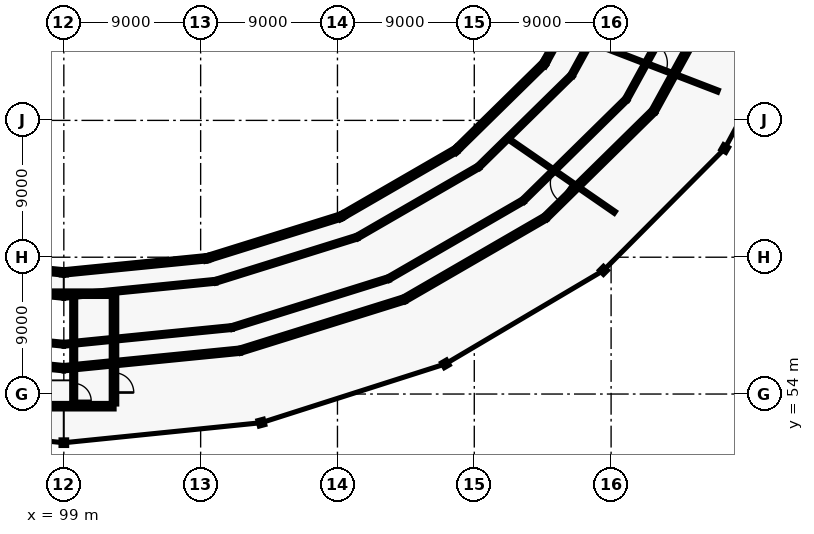
"""IFC4 building model, lengths in metres.
Left out: names, types, materials, properties, quantities, classifications, styles, units other than length and angle.
Written with IfcOpenShell. Run it as: python <this file> out.ifc"""

import sys

from ifc_helpers import new_model, si_unit, direction, frame, frame_2d, origin, origin_2d, place, context, subcontext, project, spatial, rectangle, hollow_circle, extrude, element, fill, save


model = new_model("IFC4")
c1 = context("Model", 3, precision=1e-05, world=origin(), true_north=direction((0.0, 1.0)))
c2 = subcontext(c1, "Body", "Model", "MODEL_VIEW")
j1 = project(units=[si_unit("LENGTHUNIT", "METRE"), si_unit("PLANEANGLEUNIT", "RADIAN")], contexts=[c1])
p1 = place(None, origin())
s1 = spatial("IfcSite", under=j1, at=p1, CompositionType="ELEMENT")
p2 = place(p1, origin())
s2 = spatial("IfcBuilding", under=s1, at=p2, CompositionType="ELEMENT")
p3 = place(p2, frame((0.0, 0.0, 9.6)))
s3 = spatial("IfcBuildingStorey", under=s2, at=p3, CompositionType="ELEMENT", Elevation=9.6)
p4 = place(p3, frame((99.0, 62.0, 0.0), z_axis=(0.0, 0.0, 1.0), x_axis=(0.0, -1.0, 0.0)))
e1 = element("IfcColumn", 1, at=p4, inside=s3, PredefinedType="COLUMN", context=c2, shape_type="SweptSolid", body=[
    extrude(hollow_circle(Radius=0.162, WallThickness=0.016, at=origin_2d()), origin(), (0.0, 0.0, 1.0), 4.38),
])
p5 = place(p3, frame((99.0, 50.8, 0.0), z_axis=(0.0, 0.0, 1.0), x_axis=(0.0, -1.0, 0.0)))
e2 = element("IfcColumn", 2, at=p5, inside=s3, PredefinedType="COLUMN", context=c2, shape_type="SweptSolid", body=[
    extrude(hollow_circle(Radius=0.178, WallThickness=0.016, at=origin_2d()), origin(), (0.0, 0.0, 1.0), 3.38),
])
p6 = place(p3, frame((108.447, 62.937, 0.0), z_axis=(0.0, 0.0, 1.0), x_axis=(0.258819045103, -0.965925826289, 0.0)))
e3 = element("IfcColumn", 3, at=p6, inside=s3, PredefinedType="COLUMN", context=c2, shape_type="SweptSolid", body=[
    extrude(hollow_circle(Radius=0.162, WallThickness=0.016, at=origin_2d()), origin(), (0.0, 0.0, 1.0), 4.38),
])
p7 = place(p3, frame((111.993, 52.119, 0.0), z_axis=(0.0, 0.0, 1.0), x_axis=(0.258819045103, -0.965925826289, 0.0)))
e4 = element("IfcColumn", 4, at=p7, inside=s3, PredefinedType="COLUMN", context=c2, shape_type="SweptSolid", body=[
    extrude(hollow_circle(Radius=0.178, WallThickness=0.016, at=origin_2d()), origin(), (0.0, 0.0, 1.0), 3.38),
])
p8 = place(p3, frame((117.25, 65.684, 0.0), z_axis=(0.0, 0.0, 1.0), x_axis=(0.5, -0.866025403784, 0.0)))
e5 = element("IfcColumn", 5, at=p8, inside=s3, PredefinedType="COLUMN", context=c2, shape_type="SweptSolid", body=[
    extrude(hollow_circle(Radius=0.162, WallThickness=0.016, at=origin_2d()), origin(), (0.0, 0.0, 1.0), 4.38),
])
p9 = place(p3, frame((124.1, 55.985, 0.0), z_axis=(0.0, 0.0, 1.0), x_axis=(0.5, -0.866025403784, 0.0)))
e6 = element("IfcColumn", 6, at=p9, inside=s3, PredefinedType="COLUMN", context=c2, shape_type="SweptSolid", body=[
    extrude(hollow_circle(Radius=0.178, WallThickness=0.016, at=origin_2d()), origin(), (0.0, 0.0, 1.0), 3.38),
])
p10 = place(p3, frame((124.809, 70.055, 0.0), z_axis=(0.0, 0.0, 1.0), x_axis=(0.707106781187, -0.707106781187, 0.0)))
e7 = element("IfcColumn", 7, at=p10, inside=s3, PredefinedType="COLUMN", context=c2, shape_type="SweptSolid", body=[
    extrude(hollow_circle(Radius=0.162, WallThickness=0.016, at=origin_2d()), origin(), (0.0, 0.0, 1.0), 4.38),
])
p11 = place(p3, frame((134.497, 62.135, 0.0), z_axis=(0.0, 0.0, 1.0), x_axis=(0.707106781187, -0.707106781187, 0.0)))
e8 = element("IfcColumn", 8, at=p11, inside=s3, PredefinedType="COLUMN", context=c2, shape_type="SweptSolid", body=[
    extrude(hollow_circle(Radius=0.178, WallThickness=0.016, at=origin_2d()), origin(), (0.0, 0.0, 1.0), 3.38),
])
p12 = place(p3, frame((130.61, 75.75, 0.0), z_axis=(0.0, 0.0, 1.0), x_axis=(0.866025403784, -0.5, 0.0)))
e9 = element("IfcColumn", 9, at=p12, inside=s3, PredefinedType="COLUMN", context=c2, shape_type="SweptSolid", body=[
    extrude(hollow_circle(Radius=0.162, WallThickness=0.016, at=origin_2d()), origin(), (0.0, 0.0, 1.0), 4.38),
])
p13 = place(p3, frame((142.474, 70.15, 0.0), z_axis=(0.0, 0.0, 1.0), x_axis=(0.866025403784, -0.5, 0.0)))
e10 = element("IfcColumn", 10, at=p13, inside=s3, PredefinedType="COLUMN", context=c2, shape_type="SweptSolid", body=[
    extrude(hollow_circle(Radius=0.178, WallThickness=0.016, at=origin_2d()), origin(), (0.0, 0.0, 1.0), 3.38),
])
p14 = place(p3, frame((87.405, 56.852, 4.53), z_axis=(0.0, 0.0, 1.0), x_axis=(0.995099849345, -0.098875122419, 0.0)))
e11 = element("IfcWall", 11, at=p14, inside=s3, PredefinedType="SOLIDWALL", context=c2, shape_type="SweptSolid", body=[
    extrude(rectangle(XDim=11.652, YDim=0.34, at=frame_2d((5.826, 0.0))), origin(), (0.0, 0.0, 1.0), 3.02),
])
p15 = place(p3, frame((89.553, 62.937, 4.39), z_axis=(0.0, 0.0, 1.0), x_axis=(0.995117073258, -0.098701623651, 0.0)))
e12 = element("IfcWall", 12, at=p15, inside=s3, PredefinedType="SOLIDWALL", context=c2, shape_type="SweptSolid", body=[
    extrude(rectangle(XDim=9.493, YDim=0.34, at=frame_2d((4.747, 0.0))), origin(), (0.0, 0.0, 1.0), 3.16),
])
p16 = place(p3, frame((87.942, 58.373, 7.58), z_axis=(0.0, 0.0, 1.0), x_axis=(0.995105258288, -0.098820670548, 0.0)))
e13 = element("IfcWall", 13, at=p16, inside=s3, PredefinedType="SOLIDWALL", context=c2, shape_type="SweptSolid", body=[
    extrude(rectangle(XDim=11.113, YDim=0.24, at=frame_2d((5.556, 0.0))), origin(), (0.0, 0.0, 1.0), 2.37),
])
p17 = place(p3, frame((89.016, 61.416, 7.58), z_axis=(0.0, 0.0, 1.0), x_axis=(0.995110163253, -0.098771266021, 0.0)))
e14 = element("IfcWall", 14, at=p17, inside=s3, PredefinedType="SOLIDWALL", context=c2, shape_type="SweptSolid", body=[
    extrude(rectangle(XDim=10.033, YDim=0.24, at=frame_2d((5.017, 0.0))), origin(), (0.0, 0.0, 1.0), 2.37),
])
p18 = place(p3, frame((99.0, 55.7, 4.53), z_axis=(0.0, 0.0, 1.0), x_axis=(0.995099849345, 0.098875122419, 0.0)))
e15 = element("IfcWall", 15, at=p18, inside=s3, PredefinedType="SOLIDWALL", context=c2, shape_type="SweptSolid", body=[
    extrude(rectangle(XDim=11.652, YDim=0.34, at=frame_2d((5.826, 0.0))), origin(), (0.0, 0.0, 1.0), 3.02),
])
p19 = place(p3, frame((99.0, 62.0, 4.39), z_axis=(0.0, 0.0, 1.0), x_axis=(0.995117073258, 0.098701623651, 0.0)))
e16 = element("IfcWall", 16, at=p19, inside=s3, PredefinedType="SOLIDWALL", context=c2, shape_type="SweptSolid", body=[
    extrude(rectangle(XDim=9.493, YDim=0.34, at=frame_2d((4.747, 0.0))), origin(), (0.0, 0.0, 1.0), 3.16),
])
p20 = place(p3, frame((99.0, 57.275, 7.58), z_axis=(0.0, 0.0, 1.0), x_axis=(0.995105258288, 0.098820670548, 0.0)))
e17 = element("IfcWall", 17, at=p20, inside=s3, PredefinedType="SOLIDWALL", context=c2, shape_type="SweptSolid", body=[
    extrude(rectangle(XDim=11.113, YDim=0.24, at=frame_2d((5.556, 0.0))), origin(), (0.0, 0.0, 1.0), 2.37),
])
p21 = place(p3, frame((99.0, 60.425, 7.58), z_axis=(0.0, 0.0, 1.0), x_axis=(0.995110163253, 0.098771266021, 0.0)))
e18 = element("IfcWall", 18, at=p21, inside=s3, PredefinedType="SOLIDWALL", context=c2, shape_type="SweptSolid", body=[
    extrude(rectangle(XDim=10.033, YDim=0.24, at=frame_2d((5.017, 0.0))), origin(), (0.0, 0.0, 1.0), 2.37),
])
p22 = place(p3, frame((110.595, 56.852, 4.53), z_axis=(0.0, 0.0, 1.0), x_axis=(0.95449417592, 0.298229556107, 0.0)))
e19 = element("IfcWall", 19, at=p22, inside=s3, PredefinedType="SOLIDWALL", context=c2, shape_type="SweptSolid", body=[
    extrude(rectangle(XDim=11.32, YDim=0.34, at=frame_2d((5.66, 0.0))), origin(), (0.0, 0.0, 1.0), 3.02),
])
p23 = place(p3, frame((108.447, 62.937, 4.39), z_axis=(0.0, 0.0, 1.0), x_axis=(0.9545990852, 0.297893582568, 0.0)))
e20 = element("IfcWall", 20, at=p23, inside=s3, PredefinedType="SOLIDWALL", context=c2, shape_type="SweptSolid", body=[
    extrude(rectangle(XDim=9.222, YDim=0.34, at=frame_2d((4.611, 0.0))), origin(), (0.0, 0.0, 1.0), 3.16),
])
p24 = place(p3, frame((110.058, 58.373, 7.58), z_axis=(0.0, 0.0, 1.0), x_axis=(0.954514174424, 0.298165542651, 0.0)))
e21 = element("IfcWall", 21, at=p24, inside=s3, PredefinedType="SOLIDWALL", context=c2, shape_type="SweptSolid", body=[
    extrude(rectangle(XDim=10.796, YDim=0.24, at=frame_2d((5.398, 0.0))), origin(), (0.0, 0.0, 1.0), 2.37),
])
p25 = place(p3, frame((108.984, 61.416, 7.58), z_axis=(0.0, 0.0, 1.0), x_axis=(0.954582431614, 0.29794694369, 0.0)))
e22 = element("IfcWall", 22, at=p25, inside=s3, PredefinedType="SOLIDWALL", context=c2, shape_type="SweptSolid", body=[
    extrude(rectangle(XDim=9.747, YDim=0.24, at=frame_2d((4.874, 0.0))), origin(), (0.0, 0.0, 1.0), 2.37),
])
p26 = place(p3, frame((121.4, 60.228, 4.53), z_axis=(0.0, 0.0, 1.0), x_axis=(0.865403937833, 0.501074869039, 0.0)))
e23 = element("IfcWall", 23, at=p26, inside=s3, PredefinedType="SOLIDWALL", context=c2, shape_type="SweptSolid", body=[
    extrude(rectangle(XDim=10.721, YDim=0.34, at=frame_2d((5.361, 0.0))), origin(), (0.0, 0.0, 1.0), 3.02),
])
p27 = place(p3, frame((117.25, 65.684, 4.39), z_axis=(0.0, 0.0, 1.0), x_axis=(0.865697347457, 0.500567780231, 0.0)))
e24 = element("IfcWall", 24, at=p27, inside=s3, PredefinedType="SOLIDWALL", context=c2, shape_type="SweptSolid", body=[
    extrude(rectangle(XDim=8.732, YDim=0.34, at=frame_2d((4.366, 0.0))), origin(), (0.0, 0.0, 1.0), 3.16),
])
p28 = place(p3, frame((120.363, 61.592, 7.58), z_axis=(0.0, 0.0, 1.0), x_axis=(0.865494949489, 0.500917650328, 0.0)))
e25 = element("IfcWall", 25, at=p28, inside=s3, PredefinedType="SOLIDWALL", context=c2, shape_type="SweptSolid", body=[
    extrude(rectangle(XDim=10.223, YDim=0.24, at=frame_2d((5.111, 0.0))), origin(), (0.0, 0.0, 1.0), 2.37),
])
p29 = place(p3, frame((118.288, 64.32, 7.58), z_axis=(0.0, 0.0, 1.0), x_axis=(0.865631472937, 0.500681688362, 0.0)))
e26 = element("IfcWall", 26, at=p29, inside=s3, PredefinedType="SOLIDWALL", context=c2, shape_type="SweptSolid", body=[
    extrude(rectangle(XDim=9.229, YDim=0.24, at=frame_2d((4.615, 0.0))), origin(), (0.0, 0.0, 1.0), 2.37),
])
p30 = place(p3, frame((130.678, 65.6, 4.53), z_axis=(0.0, 0.0, 1.0), x_axis=(0.713096204455, 0.701066190307, 0.0)))
e27 = element("IfcWall", 27, at=p30, inside=s3, PredefinedType="SOLIDWALL", context=c2, shape_type="SweptSolid", body=[
    extrude(rectangle(XDim=9.985, YDim=0.34, at=frame_2d((4.992, 0.0))), origin(), (0.0, 0.0, 1.0), 3.02),
])
p31 = place(p3, frame((124.809, 70.055, 4.39), z_axis=(0.0, 0.0, 1.0), x_axis=(0.713593723838, 0.700559774251, 0.0)))
e28 = element("IfcWall", 28, at=p31, inside=s3, PredefinedType="SOLIDWALL", context=c2, shape_type="SweptSolid", body=[
    extrude(rectangle(XDim=8.129, YDim=0.34, at=frame_2d((4.065, 0.0))), origin(), (0.0, 0.0, 1.0), 3.16),
])
p32 = place(p3, frame((129.211, 66.713, 7.58), z_axis=(0.0, 0.0, 1.0), x_axis=(0.713170660677, 0.700990448401, 0.0)))
e29 = element("IfcWall", 29, at=p32, inside=s3, PredefinedType="SOLIDWALL", context=c2, shape_type="SweptSolid", body=[
    extrude(rectangle(XDim=9.521, YDim=0.24, at=frame_2d((4.76, 0.0))), origin(), (0.0, 0.0, 1.0), 2.37),
])
p33 = place(p3, frame((126.277, 68.941, 7.58), z_axis=(0.0, 0.0, 1.0), x_axis=(0.713414677491, 0.700742105157, 0.0)))
e30 = element("IfcWall", 30, at=p33, inside=s3, PredefinedType="SOLIDWALL", context=c2, shape_type="SweptSolid", body=[
    extrude(rectangle(XDim=8.592, YDim=0.24, at=frame_2d((4.296, 0.0))), origin(), (0.0, 0.0, 1.0), 2.37),
])
p34 = place(p3, frame((137.798, 72.6, 4.53), z_axis=(0.0, 0.0, 1.0), x_axis=(0.481203038707, 0.876609169208, 0.0)))
e31 = element("IfcWall", 31, at=p34, inside=s3, PredefinedType="SOLIDWALL", context=c2, shape_type="SweptSolid", body=[
    extrude(rectangle(XDim=9.299, YDim=0.34, at=frame_2d((4.65, 0.0))), origin(), (0.0, 0.0, 1.0), 3.02),
])
p35 = place(p3, frame((130.61, 75.75, 4.39), z_axis=(0.0, 0.0, 1.0), x_axis=(0.481751565348, 0.876307839338, 0.0)))
e32 = element("IfcWall", 32, at=p35, inside=s3, PredefinedType="SOLIDWALL", context=c2, shape_type="SweptSolid", body=[
    extrude(rectangle(XDim=7.568, YDim=0.34, at=frame_2d((3.784, 0.0))), origin(), (0.0, 0.0, 1.0), 3.16),
])
p36 = place(p3, frame((136.001, 73.387, 7.58), z_axis=(0.0, 0.0, 1.0), x_axis=(0.48130775835, 0.876551676601, 0.0)))
e33 = element("IfcWall", 33, at=p36, inside=s3, PredefinedType="SOLIDWALL", context=c2, shape_type="SweptSolid", body=[
    extrude(rectangle(XDim=8.868, YDim=0.24, at=frame_2d((4.434, 0.0))), origin(), (0.0, 0.0, 1.0), 2.37),
])
p37 = place(p3, frame((132.407, 74.962, 7.58), z_axis=(0.0, 0.0, 1.0), x_axis=(0.481607192972, 0.876387192785, 0.0)))
e34 = element("IfcWall", 34, at=p37, inside=s3, PredefinedType="SOLIDWALL", context=c2, shape_type="SweptSolid", body=[
    extrude(rectangle(XDim=8.002, YDim=0.24, at=frame_2d((4.001, 0.0))), origin(), (0.0, 0.0, 1.0), 2.37),
])
for number, where, z_axis, x_axis in (
    (35, (95.7, 53.2, 0.0), (0.0, 0.0, 1.0), (1.0, 0.0, 0.0)),
    (36, (95.7, 60.6, 0.0), (0.0, 0.0, 1.0), (1.0, 0.0, 0.0)),
):
    element("IfcWall", number, at=place(p3, frame(where, z_axis=z_axis, x_axis=x_axis)), inside=s3, PredefinedType="SHEAR", context=c2, shape_type="SweptSolid", body=[
        extrude(rectangle(XDim=6.6, YDim=0.35, at=frame_2d((3.3, 0.0))), origin(), (0.0, 0.0, 1.0), 3.4),
    ])
p38 = place(p3, frame((102.3, 53.35, 0.0), z_axis=(0.0, 0.0, 1.0), x_axis=(0.0, 1.0, 0.0)))
e37 = element("IfcWall", 37, at=p38, inside=s3, PredefinedType="SHEAR", context=c2, shape_type="SweptSolid", body=[
    extrude(rectangle(XDim=7.1, YDim=0.35, at=frame_2d((3.55, 0.0))), origin(), (0.0, 0.0, 1.0), 3.4),
])
p39 = place(p38, frame((0.75, 0.0, 0.0)))
e38 = element("IfcOpeningElement", 38, at=p39, cuts=e37, PredefinedType="OPENING", context=c2, shape_type="SweptSolid", body=[
    extrude(rectangle(XDim=1.3, YDim=2.15, at=frame_2d((0.65, 1.075))), frame((0.0, 0.185, 0.0), z_axis=(0.0, -1.0, 0.0), x_axis=(1.0, 0.0, 0.0)), (0.0, 0.0, 1.0), 0.37),
])
p40 = place(p3, frame((99.65, 53.35, 0.0), z_axis=(0.0, 0.0, 1.0), x_axis=(0.0, 1.0, 0.0)))
e39 = element("IfcWall", 39, at=p40, inside=s3, PredefinedType="SHEAR", context=c2, shape_type="SweptSolid", body=[
    extrude(rectangle(XDim=7.1, YDim=0.25, at=frame_2d((3.55, 0.0))), origin(), (0.0, 0.0, 1.0), 3.4),
])
p41 = place(p40, frame((0.2, 0.0, 0.0)))
e40 = element("IfcOpeningElement", 40, at=p41, cuts=e39, PredefinedType="OPENING", context=c2, shape_type="SweptSolid", body=[
    extrude(rectangle(XDim=1.15, YDim=2.15, at=frame_2d((0.575, 1.075))), frame((0.0, 0.135, 0.0), z_axis=(0.0, -1.0, 0.0), x_axis=(1.0, 0.0, 0.0)), (0.0, 0.0, 1.0), 0.27),
])
p42 = place(p3, frame((128.475, 70.626, 0.0), z_axis=(0.0, 0.0, 1.0), x_axis=(0.822666462931, -0.568524309743, 0.0)))
e41 = element("IfcWall", 41, at=p42, inside=s3, PredefinedType="PARTITIONING", context=c2, shape_type="SweptSolid", body=[
    extrude(rectangle(XDim=8.223, YDim=0.13, at=frame_2d((4.112, 0.0))), origin(), (0.0, 0.0, 1.0), 2.9),
])
p43 = place(p42, frame((3.387, 0.0, 0.0)))
e42 = element("IfcOpeningElement", 42, at=p43, cuts=e41, PredefinedType="OPENING", context=c2, shape_type="SweptSolid", body=[
    extrude(rectangle(XDim=1.45, YDim=2.15, at=frame_2d((0.725, 1.075))), frame((0.0, 0.075, 0.0), z_axis=(0.0, -1.0, 0.0), x_axis=(1.0, 0.0, 0.0)), (0.0, 0.0, 1.0), 0.15),
])
p44 = place(p3, frame((133.83, 77.082, 0.0), z_axis=(0.0, 0.0, 1.0), x_axis=(0.933238808021, -0.359256631399, 0.0)))
e43 = element("IfcWall", 43, at=p44, inside=s3, PredefinedType="PARTITIONING", context=c2, shape_type="SweptSolid", body=[
    extrude(rectangle(XDim=8.782, YDim=0.13, at=frame_2d((4.391, 0.0))), origin(), (0.0, 0.0, 1.0), 2.9),
])
p45 = place(p44, frame((3.666, 0.0, 0.0)))
e44 = element("IfcOpeningElement", 44, at=p45, cuts=e43, PredefinedType="OPENING", context=c2, shape_type="SweptSolid", body=[
    extrude(rectangle(XDim=1.45, YDim=2.15, at=frame_2d((0.725, 1.075))), frame((0.0, 0.075, 0.0), z_axis=(0.0, -1.0, 0.0), x_axis=(1.0, 0.0, 0.0)), (0.0, 0.0, 1.0), 0.15),
])
p46 = place(p39, frame((1.3, 0.0, 0.0), z_axis=(0.0, 0.0, 1.0), x_axis=(-1.0, 0.0, 0.0)))
e45 = element("IfcDoor", 45, at=p46, inside=s3, OperationType="DOUBLE_DOOR_SINGLE_SWING", PredefinedType="DOOR", context=c2, shape_type="SweptSolid", body=[
    extrude(rectangle(XDim=1.3, YDim=2.15, at=frame_2d((0.65, 1.075))), frame((0.0, 0.025, 0.0), z_axis=(0.0, -1.0, 0.0), x_axis=(1.0, 0.0, 0.0)), (0.0, 0.0, 1.0), 0.05),
])
fill(e38, e45)
p47 = place(p41, frame((1.15, 0.0, 0.0), z_axis=(0.0, 0.0, 1.0), x_axis=(-1.0, 0.0, 0.0)))
e46 = element("IfcDoor", 46, at=p47, inside=s3, OperationType="SINGLE_SWING_LEFT", PredefinedType="DOOR", context=c2, shape_type="SweptSolid", body=[
    extrude(rectangle(XDim=1.15, YDim=2.15, at=frame_2d((0.575, 1.075))), frame((0.0, 0.025, 0.0), z_axis=(0.0, -1.0, 0.0), x_axis=(1.0, 0.0, 0.0)), (0.0, 0.0, 1.0), 0.05),
])
fill(e40, e46)
p48 = place(p43, origin())
e47 = element("IfcDoor", 47, at=p48, inside=s3, OperationType="SINGLE_SWING_RIGHT", PredefinedType="DOOR", context=c2, shape_type="SweptSolid", body=[
    extrude(rectangle(XDim=1.45, YDim=2.15, at=frame_2d((0.725, 1.075))), frame((0.0, 0.025, 0.0), z_axis=(0.0, -1.0, 0.0), x_axis=(1.0, 0.0, 0.0)), (0.0, 0.0, 1.0), 0.05),
])
fill(e42, e47)
p49 = place(p45, origin())
e48 = element("IfcDoor", 48, at=p49, inside=s3, OperationType="SINGLE_SWING_LEFT", PredefinedType="DOOR", context=c2, shape_type="SweptSolid", body=[
    extrude(rectangle(XDim=1.45, YDim=2.15, at=frame_2d((0.725, 1.075))), frame((0.0, 0.025, 0.0), z_axis=(0.0, -1.0, 0.0), x_axis=(1.0, 0.0, 0.0)), (0.0, 0.0, 1.0), 0.05),
])
fill(e44, e48)
save(model, sys.argv[1])
